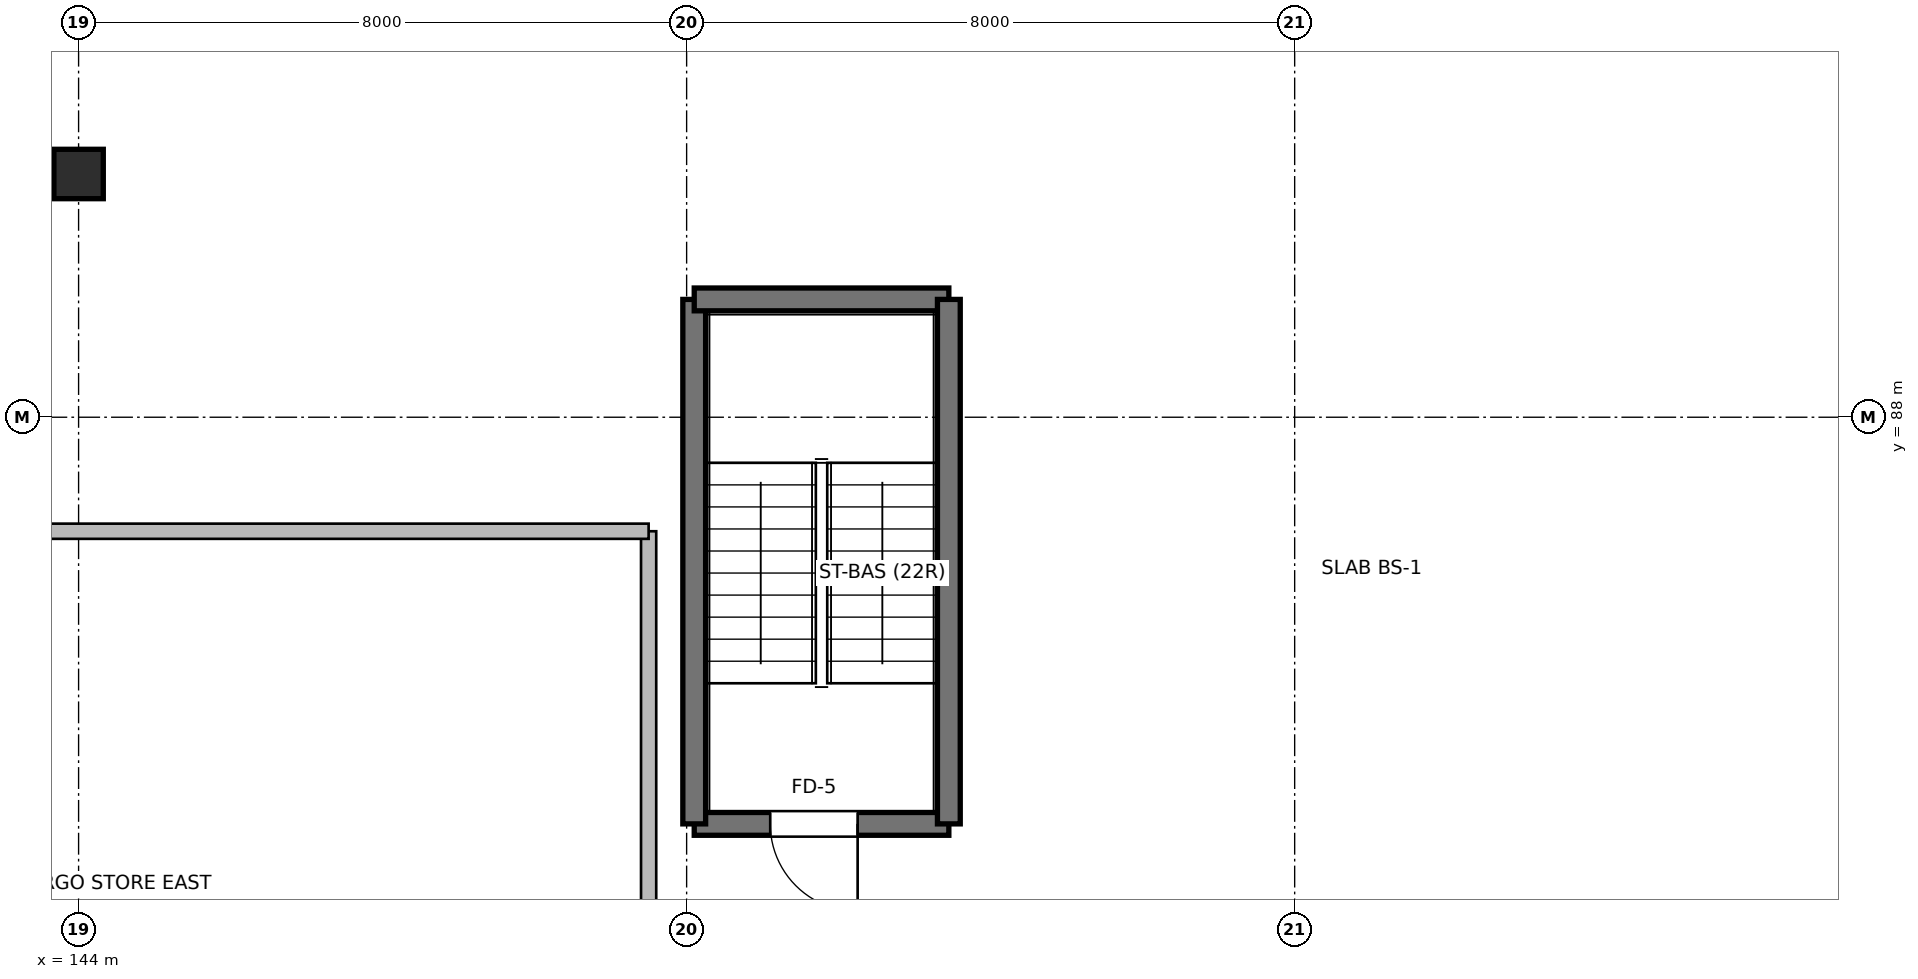
"""IFC4 building model, lengths in metres.
Left out: names, types, materials, properties, quantities, classifications, styles, units other than length and angle.
Written with IfcOpenShell. Run it as: python <this file> out.ifc"""

import sys

from ifc_helpers import new_model, si_unit, direction, frame, frame_2d, origin, origin_2d, place, context, subcontext, project, spatial, rectangle, extrude, element, fill, save


model = new_model("IFC4")
c1 = context("Model", 3, precision=1e-05, world=origin(), true_north=direction((0.0, 1.0)))
c2 = subcontext(c1, "Body", "Model", "MODEL_VIEW")
j1 = project(units=[si_unit("LENGTHUNIT", "METRE"), si_unit("PLANEANGLEUNIT", "RADIAN")], contexts=[c1])
p1 = place(None, origin())
s1 = spatial("IfcSite", under=j1, at=p1, CompositionType="ELEMENT")
p2 = place(p1, origin())
s2 = spatial("IfcBuilding", under=s1, at=p2, CompositionType="ELEMENT")
p3 = place(p2, frame((0.0, 0.0, -3.84)))
s3 = spatial("IfcBuildingStorey", under=s2, at=p3, CompositionType="ELEMENT", Elevation=-3.84)
p4 = place(p3, frame((144.0, 91.2, 0.0), z_axis=(0.0, 0.0, 1.0), x_axis=(1.0, 0.0, 0.0)))
e1 = element("IfcColumn", 1, at=p4, inside=s3, PredefinedType="COLUMN", context=c2, shape_type="SweptSolid", body=[
    extrude(rectangle(XDim=0.65, YDim=0.65, at=origin_2d()), origin(), (0.0, 0.0, 1.0), 3.84),
])
p5 = place(p3, frame((155.45, 82.65, 0.0), z_axis=(0.0, 0.0, 1.0), x_axis=(-1.0, 0.0, 0.0)))
e2 = element("IfcWall", 2, at=p5, inside=s3, PredefinedType="SHEAR", context=c2, shape_type="SweptSolid", body=[
    extrude(rectangle(XDim=3.35, YDim=0.3, at=frame_2d((1.675, 0.0))), origin(), (0.0, 0.0, 1.0), 3.52),
])
p6 = place(p5, frame((1.2, 0.0, 0.0)))
e3 = element("IfcOpeningElement", 3, at=p6, cuts=e2, PredefinedType="OPENING", context=c2, shape_type="SweptSolid", body=[
    extrude(rectangle(XDim=1.15, YDim=2.2, at=frame_2d((0.575, 1.1))), frame((0.0, 0.16, 0.0), z_axis=(0.0, -1.0, 0.0), x_axis=(1.0, 0.0, 0.0)), (0.0, 0.0, 1.0), 0.32),
])
p7 = place(p3, frame((152.1, 82.65, 0.0), z_axis=(0.0, 0.0, 1.0), x_axis=(0.0, 1.0, 0.0)))
e4 = element("IfcWall", 4, at=p7, inside=s3, PredefinedType="SHEAR", context=c2, shape_type="SweptSolid", body=[
    extrude(rectangle(XDim=6.9, YDim=0.3, at=frame_2d((3.45, 0.0))), origin(), (0.0, 0.0, 1.0), 3.52),
])
p8 = place(p3, frame((152.1, 89.55, 0.0), z_axis=(0.0, 0.0, 1.0), x_axis=(1.0, 0.0, 0.0)))
e5 = element("IfcWall", 5, at=p8, inside=s3, PredefinedType="SHEAR", context=c2, shape_type="SweptSolid", body=[
    extrude(rectangle(XDim=3.35, YDim=0.3, at=frame_2d((1.675, 0.0))), origin(), (0.0, 0.0, 1.0), 3.52),
])
p9 = place(p3, frame((155.45, 89.55, 0.0), z_axis=(0.0, 0.0, 1.0), x_axis=(0.0, -1.0, 0.0)))
e6 = element("IfcWall", 6, at=p9, inside=s3, PredefinedType="SHEAR", context=c2, shape_type="SweptSolid", body=[
    extrude(rectangle(XDim=6.9, YDim=0.3, at=frame_2d((3.45, 0.0))), origin(), (0.0, 0.0, 1.0), 3.52),
])
p10 = place(p3, frame((151.5, 77.2, 0.0), z_axis=(0.0, 0.0, 1.0), x_axis=(0.0, 1.0, 0.0)))
e7 = element("IfcWall", 7, at=p10, inside=s3, PredefinedType="SOLIDWALL", context=c2, shape_type="SweptSolid", body=[
    extrude(rectangle(XDim=9.3, YDim=0.2, at=frame_2d((4.65, 0.0))), origin(), (0.0, 0.0, 1.0), 3.52),
])
p11 = place(p3, frame((151.5, 86.5, 0.0), z_axis=(0.0, 0.0, 1.0), x_axis=(-1.0, 0.0, 0.0)))
e8 = element("IfcWall", 8, at=p11, inside=s3, PredefinedType="SOLIDWALL", context=c2, shape_type="SweptSolid", body=[
    extrude(rectangle(XDim=19.5, YDim=0.2, at=frame_2d((9.75, 0.0))), origin(), (0.0, 0.0, 1.0), 3.52),
])
p12 = place(p11, frame((9.25, 0.0, 0.0)))
e9 = element("IfcOpeningElement", 9, at=p12, cuts=e8, PredefinedType="OPENING", context=c2, shape_type="SweptSolid", body=[
    extrude(rectangle(XDim=1.0, YDim=2.1, at=frame_2d((0.5, 1.05))), frame((0.0, 0.11, 0.0), z_axis=(0.0, -1.0, 0.0), x_axis=(1.0, 0.0, 0.0)), (0.0, 0.0, 1.0), 0.22),
])
p13 = place(p6, origin())
e10 = element("IfcDoor", 10, at=p13, inside=s3, OperationType="SINGLE_SWING_LEFT", PredefinedType="DOOR", context=c2, shape_type="SweptSolid", body=[
    extrude(rectangle(XDim=1.15, YDim=2.2, at=frame_2d((0.575, 1.1))), frame((0.0, 0.025, 0.0), z_axis=(0.0, -1.0, 0.0), x_axis=(1.0, 0.0, 0.0)), (0.0, 0.0, 1.0), 0.05),
])
fill(e3, e10)
save(model, sys.argv[1])
